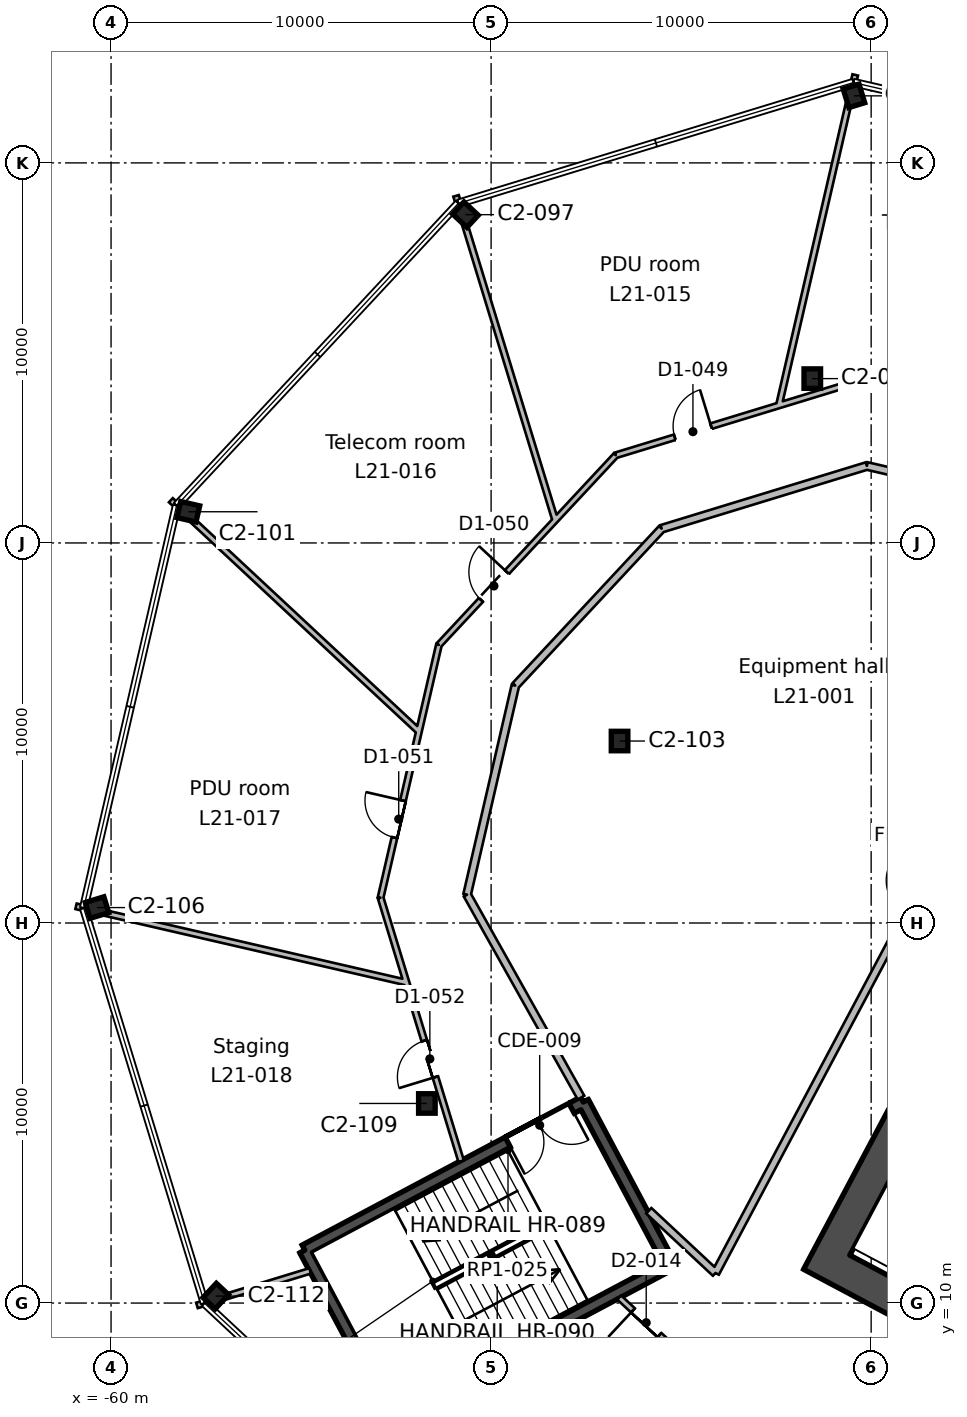
"""IFC4 building model, lengths in metres.
Left out: names, types, materials, properties, quantities, classifications, styles, units other than length and angle.
Written with IfcOpenShell. Run it as: python <this file> out.ifc"""

import sys

from ifc_helpers import new_model, si_unit, direction, frame, frame_2d, origin, origin_2d, place, context, subcontext, project, spatial, rectangle, i_section, extrude, element, fill, save


model = new_model("IFC4")
c1 = context("Model", 3, precision=1e-05, world=origin(), true_north=direction((0.0, 1.0)))
c2 = subcontext(c1, "Body", "Model", "MODEL_VIEW")
j1 = project(units=[si_unit("LENGTHUNIT", "METRE"), si_unit("PLANEANGLEUNIT", "RADIAN")], contexts=[c1])
p1 = place(None, origin())
s1 = spatial("IfcSite", under=j1, at=p1, CompositionType="ELEMENT")
p2 = place(p1, origin())
s2 = spatial("IfcBuilding", under=s1, at=p2, CompositionType="ELEMENT")
p3 = place(p2, frame((0.0, 0.0, 107.6)))
s3 = spatial("IfcBuildingStorey", under=s2, at=p3, CompositionType="ELEMENT", Elevation=107.6)
for number, where, z_axis, x_axis in (
    (1, (-57.245, 10.183, 0.0), (0.0, 0.0, 1.0), (0.731, -0.682, 0.0)),
    (2, (-51.69, 15.252, 0.0), (0.0, 0.0, 1.0), (1.0, 0.0, 0.0)),
    (3, (-60.37, 20.406, 0.0), (0.0, 0.0, 1.0), (0.292, -0.956, 0.0)),
    (4, (-46.62, 24.788, 0.0), (0.0, 0.0, 1.0), (1.0, 0.0, 0.0)),
    (5, (-57.966, 30.821, 0.0), (0.0, 0.0, 1.0), (-0.225, -0.974, 0.0)),
    (6, (-41.549, 34.324, 0.0), (0.0, 0.0, 1.0), (1.0, 0.0, 0.0)),
    (7, (-50.675, 38.638, 0.0), (0.0, 0.0, 1.0), (-0.682, -0.731, 0.0)),
    (8, (-40.453, 41.764, 0.0), (0.0, 0.0, 1.0), (-0.956, -0.292, 0.0)),
):
    element("IfcColumn", number, at=place(p3, frame(where, z_axis=z_axis, x_axis=x_axis)), inside=s3, PredefinedType="COLUMN", context=c2, shape_type="SweptSolid", body=[
        extrude(i_section(OverallWidth=0.437, OverallDepth=0.513, WebThickness=0.061, FlangeThickness=0.097, FilletRadius=0.015, at=origin_2d()), origin(), (0.0, 0.0, 1.0), 4.6),
    ])
p4 = place(p3, frame((-31.992, 28.336, 0.0), z_axis=(0.0, 0.0, 1.0), x_axis=(-0.46947084998, -0.882947971864, 0.0)))
e9 = element("IfcWall", 9, at=p4, inside=s3, PredefinedType="SHEAR", context=c2, shape_type="SweptSolid", body=[
    extrude(rectangle(XDim=20.0, YDim=0.9, at=frame_2d((10.0, 0.0))), origin(), (0.0, 0.0, 1.0), 4.6),
])
p5 = place(p4, frame((10.6, 0.0, 0.0)))
e10 = element("IfcOpeningElement", 10, at=p5, cuts=e9, PredefinedType="OPENING", context=c2, shape_type="SweptSolid", body=[
    extrude(rectangle(XDim=2.4, YDim=2.4, at=frame_2d((1.2, 1.2))), frame((0.0, 0.46, 0.0), z_axis=(0.0, -1.0, 0.0), x_axis=(1.0, 0.0, 0.0)), (0.0, 0.0, 1.0), 0.92),
])
p6 = place(p3, frame((-22.937, 1.38, 0.0), z_axis=(0.0, 0.0, 1.0), x_axis=(-0.88295276571, 0.46946183394, 0.0)))
e11 = element("IfcWall", 11, at=p6, inside=s3, PredefinedType="SHEAR", context=c2, shape_type="SweptSolid", body=[
    extrude(rectangle(XDim=20.2, YDim=0.9, at=frame_2d((10.1, 0.0))), origin(), (0.0, 0.0, 1.0), 4.6),
])
p7 = place(p3, frame((-47.574, 15.29, 0.0), z_axis=(0.0, 0.0, 1.0), x_axis=(0.469443498566, -0.882962514297, 0.0)))
e12 = element("IfcWall", 12, at=p7, inside=s3, PredefinedType="SHEAR", context=c2, shape_type="SweptSolid", body=[
    extrude(rectangle(XDim=4.85, YDim=0.3, at=frame_2d((2.425, 0.0))), origin(), (0.0, 0.0, 1.0), 4.6),
])
p8 = place(p3, frame((-45.297, 11.007, 0.0), z_axis=(0.0, 0.0, 1.0), x_axis=(-0.882951519127, -0.469464178475, 0.0)))
e13 = element("IfcWall", 13, at=p8, inside=s3, PredefinedType="SHEAR", context=c2, shape_type="SweptSolid", body=[
    extrude(rectangle(XDim=8.3, YDim=0.3, at=frame_2d((4.15, 0.0))), origin(), (0.0, 0.0, 1.0), 4.6),
])
p9 = place(p3, frame((-52.626, 7.111, 0.0), z_axis=(0.0, 0.0, 1.0), x_axis=(-0.469464364128, 0.882951420416, 0.0)))
e14 = element("IfcWall", 14, at=p9, inside=s3, PredefinedType="SHEAR", context=c2, shape_type="SweptSolid", body=[
    extrude(rectangle(XDim=4.85, YDim=0.3, at=frame_2d((2.425, 0.0))), origin(), (0.0, 0.0, 1.0), 4.6),
])
p10 = place(p3, frame((-54.903, 11.393, 0.0), z_axis=(0.0, 0.0, 1.0), x_axis=(0.882939326045, 0.469487110071, 0.0)))
e15 = element("IfcWall", 15, at=p10, inside=s3, PredefinedType="SHEAR", context=c2, shape_type="SweptSolid", body=[
    extrude(rectangle(XDim=8.3, YDim=0.3, at=frame_2d((4.15, 0.0))), origin(), (0.0, 0.0, 1.0), 4.6),
])
p11 = place(p10, frame((6.05, 0.0, 0.0)))
e16 = element("IfcOpeningElement", 16, at=p11, cuts=e15, PredefinedType="OPENING", context=c2, shape_type="SweptSolid", body=[
    extrude(rectangle(XDim=1.9, YDim=2.1, at=frame_2d((0.95, 1.05))), frame((0.0, 0.16, 0.0), z_axis=(0.0, -1.0, 0.0), x_axis=(1.0, 0.0, 0.0)), (0.0, 0.0, 1.0), 0.32),
])
p12 = place(p3, frame((-52.225, 18.432, 0.0), z_axis=(0.0, 0.0, 1.0), x_axis=(-0.974365373768, 0.224971372407, 0.0)))
e17 = element("IfcWall", 17, at=p12, inside=s3, PredefinedType="PARTITIONING", context=c2, shape_type="SweptSolid", body=[
    extrude(rectangle(XDim=8.926, YDim=0.15, at=frame_2d((4.463, 0.0))), origin(), (0.0, 0.0, 1.0), 4.15),
])
p13 = place(p3, frame((-58.427, 31.125, 0.0), z_axis=(0.0, 0.0, 1.0), x_axis=(0.731442667258, -0.681902943618, 0.0)))
e18 = element("IfcWall", 18, at=p13, inside=s3, PredefinedType="PARTITIONING", context=c2, shape_type="SweptSolid", body=[
    extrude(rectangle(XDim=8.925, YDim=0.15, at=frame_2d((4.462, 0.0))), origin(), (0.0, 0.0, 1.0), 4.15),
])
p14 = place(p3, frame((-54.761, 10.848, 0.0), z_axis=(0.0, 0.0, 1.0), x_axis=(-0.956301064033, -0.29238378021, 0.0)))
e19 = element("IfcWall", 19, at=p14, inside=s3, PredefinedType="PARTITIONING", context=c2, shape_type="SweptSolid", body=[
    extrude(rectangle(XDim=3.115, YDim=0.15, at=frame_2d((1.558, 0.0))), origin(), (0.0, 0.0, 1.0), 4.15),
])
p15 = place(p3, frame((-51.887, 25.092, 0.0), z_axis=(0.0, 0.0, 1.0), x_axis=(-0.224777071087, -0.974410215625, 0.0)))
e20 = element("IfcWall", 20, at=p15, inside=s3, PredefinedType="PARTITIONING", context=c2, shape_type="SweptSolid", body=[
    extrude(rectangle(XDim=4.542, YDim=0.15, at=frame_2d((2.271, 0.0))), origin(), (0.0, 0.0, 1.0), 4.15),
])
p16 = place(p15, frame((1.92, 0.0, 0.0)))
e21 = element("IfcOpeningElement", 21, at=p16, cuts=e20, PredefinedType="OPENING", context=c2, shape_type="SweptSolid", body=[
    extrude(rectangle(XDim=1.0, YDim=2.1, at=frame_2d((0.5, 1.05))), frame((0.0, 0.085, 0.0), z_axis=(0.0, -1.0, 0.0), x_axis=(1.0, 0.0, 0.0)), (0.0, 0.0, 1.0), 0.17),
])
p17 = place(p3, frame((-52.908, 20.666, 0.0), z_axis=(0.0, 0.0, 1.0), x_axis=(0.292191363623, -0.956359873177, 0.0)))
e22 = element("IfcWall", 22, at=p17, inside=s3, PredefinedType="PARTITIONING", context=c2, shape_type="SweptSolid", body=[
    extrude(rectangle(XDim=2.283, YDim=0.15, at=frame_2d((1.141, 0.0))), origin(), (0.0, 0.0, 1.0), 4.15),
])
p18 = place(p3, frame((-50.789, 13.734, 0.0), z_axis=(0.0, 0.0, 1.0), x_axis=(-0.292444580727, 0.956282472496, 0.0)))
e23 = element("IfcWall", 23, at=p18, inside=s3, PredefinedType="PARTITIONING", context=c2, shape_type="SweptSolid", body=[
    extrude(rectangle(XDim=4.966, YDim=0.15, at=frame_2d((2.483, 0.0))), origin(), (0.0, 0.0, 1.0), 4.15),
])
p19 = place(p18, frame((2.315, 0.0, 0.0)))
e24 = element("IfcOpeningElement", 24, at=p19, cuts=e23, PredefinedType="OPENING", context=c2, shape_type="SweptSolid", body=[
    extrude(rectangle(XDim=1.0, YDim=2.1, at=frame_2d((0.5, 1.05))), frame((0.0, 0.085, 0.0), z_axis=(0.0, -1.0, 0.0), x_axis=(1.0, 0.0, 0.0)), (0.0, 0.0, 1.0), 0.17),
])
p20 = place(p3, frame((-48.276, 30.637, 0.0), z_axis=(0.0, 0.0, 1.0), x_axis=(-0.682027037636, -0.731326958298, 0.0)))
e25 = element("IfcWall", 25, at=p20, inside=s3, PredefinedType="PARTITIONING", context=c2, shape_type="SweptSolid", body=[
    extrude(rectangle(XDim=4.541, YDim=0.15, at=frame_2d((2.271, 0.0))), origin(), (0.0, 0.0, 1.0), 4.15),
])
p21 = place(p20, frame((1.919, 0.0, 0.0)))
e26 = element("IfcOpeningElement", 26, at=p21, cuts=e25, PredefinedType="OPENING", context=c2, shape_type="SweptSolid", body=[
    extrude(rectangle(XDim=1.0, YDim=2.1, at=frame_2d((0.5, 1.05))), frame((0.0, 0.085, 0.0), z_axis=(0.0, -1.0, 0.0), x_axis=(1.0, 0.0, 0.0)), (0.0, 0.0, 1.0), 0.17),
])
p22 = place(p3, frame((-51.373, 27.316, 0.0), z_axis=(0.0, 0.0, 1.0), x_axis=(-0.225156347623, -0.974322646316, 0.0)))
e27 = element("IfcWall", 27, at=p22, inside=s3, PredefinedType="PARTITIONING", context=c2, shape_type="SweptSolid", body=[
    extrude(rectangle(XDim=2.282, YDim=0.15, at=frame_2d((1.141, 0.0))), origin(), (0.0, 0.0, 1.0), 4.15),
])
p23 = place(p3, frame((-50.922, 39.133, 0.0), z_axis=(0.0, 0.0, 1.0), x_axis=(0.292438129445, -0.956284445365, 0.0)))
e28 = element("IfcWall", 28, at=p23, inside=s3, PredefinedType="PARTITIONING", context=c2, shape_type="SweptSolid", body=[
    extrude(rectangle(XDim=8.925, YDim=0.15, at=frame_2d((4.463, 0.0))), origin(), (0.0, 0.0, 1.0), 4.15),
])
p24 = place(p3, frame((-42.397, 33.628, 0.0), z_axis=(0.0, 0.0, 1.0), x_axis=(-0.956325147795, -0.292304997725, 0.0)))
e29 = element("IfcWall", 29, at=p24, inside=s3, PredefinedType="PARTITIONING", context=c2, shape_type="SweptSolid", body=[
    extrude(rectangle(XDim=4.519, YDim=0.15, at=frame_2d((2.26, 0.0))), origin(), (0.0, 0.0, 1.0), 4.15),
])
p25 = place(p24, frame((1.897, 0.0, 0.0)))
e30 = element("IfcOpeningElement", 30, at=p25, cuts=e29, PredefinedType="OPENING", context=c2, shape_type="SweptSolid", body=[
    extrude(rectangle(XDim=1.0, YDim=2.1, at=frame_2d((0.5, 1.05))), frame((0.0, 0.085, 0.0), z_axis=(0.0, -1.0, 0.0), x_axis=(1.0, 0.0, 0.0)), (0.0, 0.0, 1.0), 0.17),
])
p26 = place(p3, frame((-46.719, 32.307, 0.0), z_axis=(0.0, 0.0, 1.0), x_axis=(-0.681918098211, -0.731428538774, 0.0)))
e31 = element("IfcWall", 31, at=p26, inside=s3, PredefinedType="PARTITIONING", context=c2, shape_type="SweptSolid", body=[
    extrude(rectangle(XDim=2.283, YDim=0.15, at=frame_2d((1.142, 0.0))), origin(), (0.0, 0.0, 1.0), 4.15),
])
p27 = place(p3, frame((-47.635, 15.406, 0.0), z_axis=(0.0, 0.0, 1.0), x_axis=(-0.48945286171, 0.872029756467, 0.0)))
e32 = element("IfcWall", 32, at=p27, inside=s3, PredefinedType="PARTITIONING", context=c2, shape_type="SweptSolid", body=[
    extrude(rectangle(XDim=6.124, YDim=0.2, at=frame_2d((3.062, 0.0))), origin(), (0.0, 0.0, 1.0), 4.15),
])
p28 = place(p3, frame((-50.632, 20.746, 0.0), z_axis=(0.0, 0.0, 1.0), x_axis=(0.22499217369, 0.974360570722, 0.0)))
e33 = element("IfcWall", 33, at=p28, inside=s3, PredefinedType="PARTITIONING", context=c2, shape_type="SweptSolid", body=[
    extrude(rectangle(XDim=5.645, YDim=0.2, at=frame_2d((2.822, 0.0))), origin(), (0.0, 0.0, 1.0), 4.15),
])
p29 = place(p3, frame((-49.362, 26.246, 0.0), z_axis=(0.0, 0.0, 1.0), x_axis=(0.681982280618, 0.731368695613, 0.0)))
e34 = element("IfcWall", 34, at=p29, inside=s3, PredefinedType="PARTITIONING", context=c2, shape_type="SweptSolid", body=[
    extrude(rectangle(XDim=5.646, YDim=0.2, at=frame_2d((2.823, 0.0))), origin(), (0.0, 0.0, 1.0), 4.15),
])
p30 = place(p3, frame((-45.512, 30.375, 0.0), z_axis=(0.0, 0.0, 1.0), x_axis=(0.956291797198, 0.292414087576, 0.0)))
e35 = element("IfcWall", 35, at=p30, inside=s3, PredefinedType="PARTITIONING", context=c2, shape_type="SweptSolid", body=[
    extrude(rectangle(XDim=5.646, YDim=0.2, at=frame_2d((2.823, 0.0))), origin(), (0.0, 0.0, 1.0), 4.15),
])
p31 = place(p3, frame((-40.113, 32.026, 0.0), z_axis=(0.0, 0.0, 1.0), x_axis=(0.974363470519, -0.224979615338, 0.0)))
e36 = element("IfcWall", 36, at=p31, inside=s3, PredefinedType="PARTITIONING", context=c2, shape_type="SweptSolid", body=[
    extrude(rectangle(XDim=6.68, YDim=0.2, at=frame_2d((3.34, 0.0))), origin(), (0.0, 0.0, 1.0), 4.15),
])
p32 = place(p3, frame((-33.604, 30.523, 0.0), z_axis=(0.0, 0.0, 1.0), x_axis=(-0.469481615166, -0.88294224784, 0.0)))
e37 = element("IfcWall", 37, at=p32, inside=s3, PredefinedType="PARTITIONING", context=c2, shape_type="SweptSolid", body=[
    extrude(rectangle(XDim=22.348, YDim=0.2, at=frame_2d((11.174, 0.0))), origin(), (0.0, 0.0, 1.0), 4.15),
])
p33 = place(p32, frame((10.65, 0.0, 0.0)))
e38 = element("IfcOpeningElement", 38, at=p33, cuts=e37, PredefinedType="OPENING", context=c2, shape_type="SweptSolid", body=[
    extrude(rectangle(XDim=1.0, YDim=2.1, at=frame_2d((0.5, 1.05))), frame((0.0, 0.11, 0.0), z_axis=(0.0, -1.0, 0.0), x_axis=(1.0, 0.0, 0.0)), (0.0, 0.0, 1.0), 0.22),
])
p34 = place(p3, frame((-44.096, 10.791, 0.0), z_axis=(0.0, 0.0, 1.0), x_axis=(-0.73104174178, 0.68233274271, 0.0)))
e39 = element("IfcWall", 39, at=p34, inside=s3, PredefinedType="PARTITIONING", context=c2, shape_type="SweptSolid", body=[
    extrude(rectangle(XDim=2.401, YDim=0.2, at=frame_2d((1.2, 0.0))), origin(), (0.0, 0.0, 1.0), 4.15),
])
p35 = place(p3, frame((-45.169, 8.784, 0.0), z_axis=(0.0, 0.0, 1.0), x_axis=(-0.731437429629, 0.681908561714, 0.0)))
e40 = element("IfcWall", 40, at=p35, inside=s3, PredefinedType="PARTITIONING", context=c2, shape_type="SweptSolid", body=[
    extrude(rectangle(XDim=1.996, YDim=0.15, at=frame_2d((0.998, 0.0))), origin(), (0.0, 0.0, 1.0), 4.15),
])
p36 = place(p35, frame((0.55, 0.0, 0.0)))
e41 = element("IfcOpeningElement", 41, at=p36, cuts=e40, PredefinedType="OPENING", context=c2, shape_type="SweptSolid", body=[
    extrude(rectangle(XDim=0.95, YDim=2.1, at=frame_2d((0.475, 1.05))), frame((0.0, 0.085, 0.0), z_axis=(0.0, -1.0, 0.0), x_axis=(1.0, 0.0, 0.0)), (0.0, 0.0, 1.0), 0.17),
])
p37 = place(p3, frame((-40.419, 42.315, 0.0), z_axis=(0.0, 0.0, 1.0), x_axis=(-0.224995357726, -0.974359835483, 0.0)))
e42 = element("IfcWall", 42, at=p37, inside=s3, PredefinedType="PARTITIONING", context=c2, shape_type="SweptSolid", body=[
    extrude(rectangle(XDim=8.925, YDim=0.15, at=frame_2d((4.462, 0.0))), origin(), (0.0, 0.0, 1.0), 4.15),
])
p38 = place(p3, frame((-34.756, 33.047, 0.0), z_axis=(0.0, 0.0, 1.0), x_axis=(-0.974383821035, 0.224891461164, 0.0)))
e43 = element("IfcWall", 43, at=p38, inside=s3, PredefinedType="PARTITIONING", context=c2, shape_type="SweptSolid", body=[
    extrude(rectangle(XDim=5.58, YDim=0.15, at=frame_2d((2.79, 0.0))), origin(), (0.0, 0.0, 1.0), 4.15),
])
p39 = place(p38, frame((2.251, 0.0, 0.0)))
e44 = element("IfcOpeningElement", 44, at=p39, cuts=e43, PredefinedType="OPENING", context=c2, shape_type="SweptSolid", body=[
    extrude(rectangle(XDim=1.0, YDim=2.1, at=frame_2d((0.5, 1.05))), frame((0.0, 0.085, 0.0), z_axis=(0.0, -1.0, 0.0), x_axis=(1.0, 0.0, 0.0)), (0.0, 0.0, 1.0), 0.17),
])
p40 = place(p3, frame((-40.193, 34.302, 0.0), z_axis=(0.0, 0.0, 1.0), x_axis=(-0.95627012067, -0.292484967671, 0.0)))
e45 = element("IfcWall", 45, at=p40, inside=s3, PredefinedType="PARTITIONING", context=c2, shape_type="SweptSolid", body=[
    extrude(rectangle(XDim=2.305, YDim=0.15, at=frame_2d((1.152, 0.0))), origin(), (0.0, 0.0, 1.0), 4.15),
])
p41 = place(p11, frame((1.9, 0.0, 0.0), z_axis=(0.0, 0.0, 1.0), x_axis=(-1.0, 0.0, 0.0)))
e46 = element("IfcDoor", 46, at=p41, inside=s3, OperationType="DOUBLE_DOOR_SINGLE_SWING", PredefinedType="DOOR", context=c2, shape_type="SweptSolid", body=[
    extrude(rectangle(XDim=1.9, YDim=2.1, at=frame_2d((0.95, 1.05))), frame((0.0, 0.025, 0.0), z_axis=(0.0, -1.0, 0.0), x_axis=(1.0, 0.0, 0.0)), (0.0, 0.0, 1.0), 0.05),
])
fill(e16, e46)
p42 = place(p25, frame((1.0, 0.0, 0.0), z_axis=(0.0, 0.0, 1.0), x_axis=(-1.0, 0.0, 0.0)))
e47 = element("IfcDoor", 47, at=p42, inside=s3, OperationType="SINGLE_SWING_RIGHT", PredefinedType="DOOR", context=c2, shape_type="SweptSolid", body=[
    extrude(rectangle(XDim=1.0, YDim=2.1, at=frame_2d((0.5, 1.05))), frame((0.0, 0.025, 0.0), z_axis=(0.0, -1.0, 0.0), x_axis=(1.0, 0.0, 0.0)), (0.0, 0.0, 1.0), 0.05),
])
fill(e30, e47)
p43 = place(p21, frame((1.0, 0.0, 0.0), z_axis=(0.0, 0.0, 1.0), x_axis=(-1.0, 0.0, 0.0)))
e48 = element("IfcDoor", 48, at=p43, inside=s3, OperationType="SINGLE_SWING_RIGHT", PredefinedType="DOOR", context=c2, shape_type="SweptSolid", body=[
    extrude(rectangle(XDim=1.0, YDim=2.1, at=frame_2d((0.5, 1.05))), frame((0.0, 0.025, 0.0), z_axis=(0.0, -1.0, 0.0), x_axis=(1.0, 0.0, 0.0)), (0.0, 0.0, 1.0), 0.05),
])
fill(e26, e48)
p44 = place(p16, frame((1.0, 0.0, 0.0), z_axis=(0.0, 0.0, 1.0), x_axis=(-1.0, 0.0, 0.0)))
e49 = element("IfcDoor", 49, at=p44, inside=s3, OperationType="SINGLE_SWING_RIGHT", PredefinedType="DOOR", context=c2, shape_type="SweptSolid", body=[
    extrude(rectangle(XDim=1.0, YDim=2.1, at=frame_2d((0.5, 1.05))), frame((0.0, 0.025, 0.0), z_axis=(0.0, -1.0, 0.0), x_axis=(1.0, 0.0, 0.0)), (0.0, 0.0, 1.0), 0.05),
])
fill(e21, e49)
p45 = place(p19, origin())
e50 = element("IfcDoor", 50, at=p45, inside=s3, OperationType="SINGLE_SWING_LEFT", PredefinedType="DOOR", context=c2, shape_type="SweptSolid", body=[
    extrude(rectangle(XDim=1.0, YDim=2.1, at=frame_2d((0.5, 1.05))), frame((0.0, 0.025, 0.0), z_axis=(0.0, -1.0, 0.0), x_axis=(1.0, 0.0, 0.0)), (0.0, 0.0, 1.0), 0.05),
])
fill(e24, e50)
p46 = place(p36, origin())
e51 = element("IfcDoor", 51, at=p46, inside=s3, OperationType="SINGLE_SWING_RIGHT", PredefinedType="DOOR", context=c2, shape_type="SweptSolid", body=[
    extrude(rectangle(XDim=0.95, YDim=2.1, at=frame_2d((0.475, 1.05))), frame((0.0, 0.025, 0.0), z_axis=(0.0, -1.0, 0.0), x_axis=(1.0, 0.0, 0.0)), (0.0, 0.0, 1.0), 0.05),
])
fill(e41, e51)
save(model, sys.argv[1])
